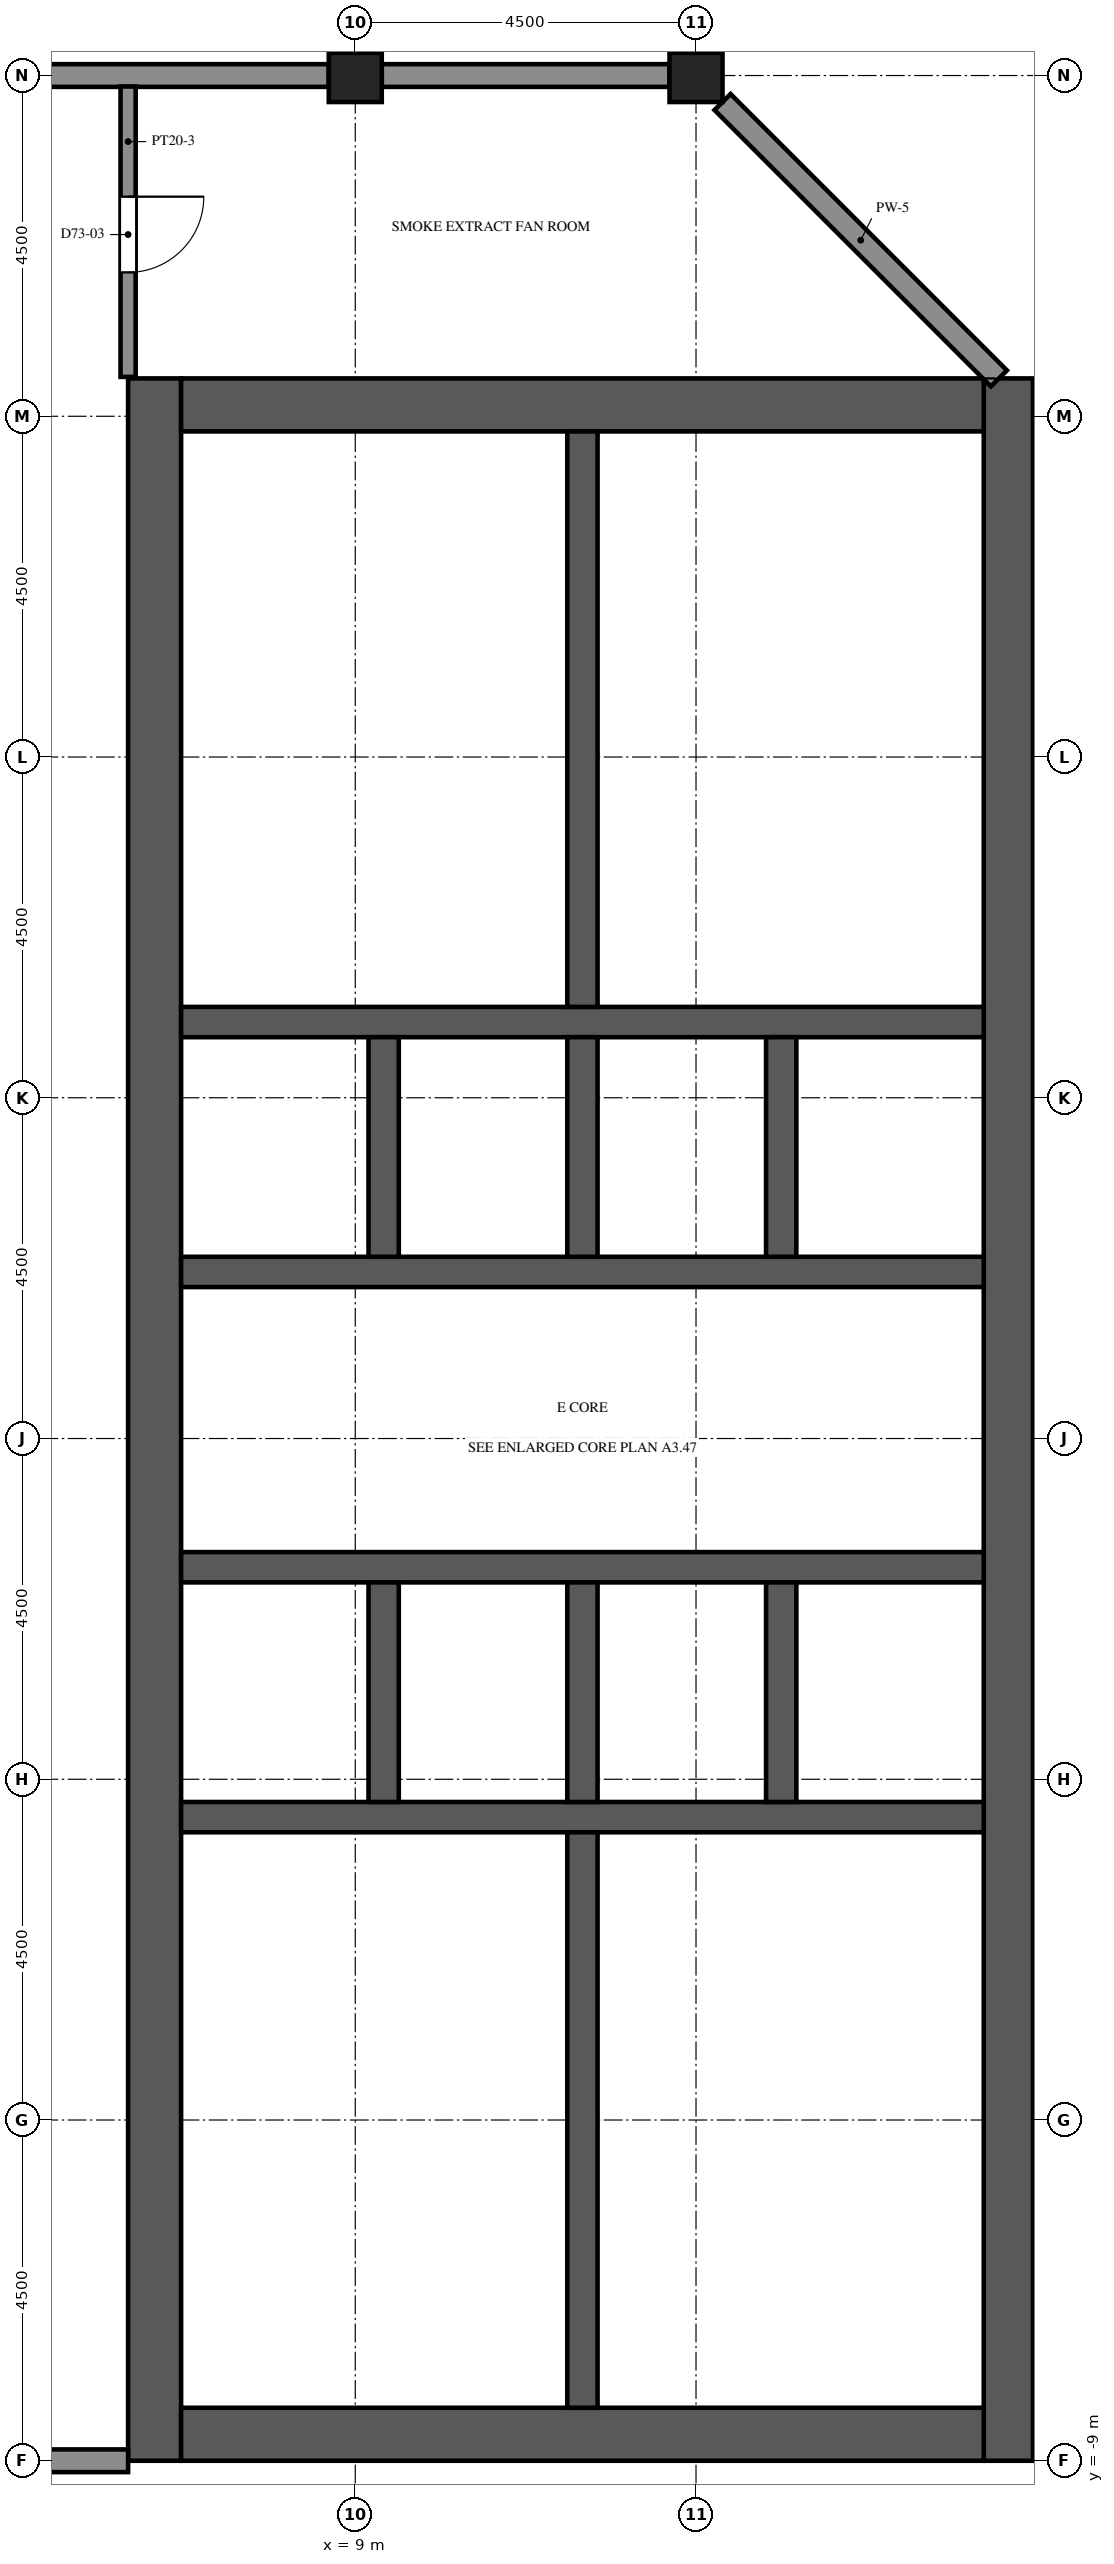
"""IFC4 building model, lengths in metres.
Left out: names, types, materials, properties, quantities, classifications, styles, units other than length and angle.
Written with IfcOpenShell. Run it as: python <this file> out.ifc"""

import sys

from ifc_helpers import new_model, si_unit, direction, frame, frame_2d, origin, origin_2d, place, context, subcontext, project, spatial, rectangle, extrude, element, fill, save


model = new_model("IFC4")
c1 = context("Model", 3, precision=1e-05, world=origin(), true_north=direction((0.0, 1.0)))
c2 = subcontext(c1, "Body", "Model", "MODEL_VIEW")
j1 = project(units=[si_unit("LENGTHUNIT", "METRE"), si_unit("PLANEANGLEUNIT", "RADIAN")], contexts=[c1])
p1 = place(None, origin())
s1 = spatial("IfcSite", under=j1, at=p1, CompositionType="ELEMENT")
p2 = place(p1, origin())
s2 = spatial("IfcBuilding", under=s1, at=p2, CompositionType="ELEMENT")
p3 = place(p2, frame((0.0, 0.0, 326.2)))
s3 = spatial("IfcBuildingStorey", under=s2, at=p3, CompositionType="ELEMENT", Elevation=326.2)
for number, where, z_axis, x_axis in (
    (1, (9.0, 22.5, 0.0), (0.0, 0.0, 1.0), (1.0, 0.0, 0.0)),
    (2, (13.5, 22.5, 0.0), (0.0, 0.0, 1.0), (1.0, 0.0, 0.0)),
):
    element("IfcColumn", number, at=place(p3, frame(where, z_axis=z_axis, x_axis=x_axis)), inside=s3, PredefinedType="COLUMN", context=c2, shape_type="SweptSolid", body=[
        extrude(rectangle(XDim=0.7, YDim=0.7, at=origin_2d()), origin(), (0.0, 0.0, 1.0), 3.6),
    ])
p4 = place(p3, frame((6.35, -9.0, 0.0), z_axis=(0.0, 0.0, 1.0), x_axis=(0.0, 1.0, 0.0)))
e3 = element("IfcWall", 3, at=p4, inside=s3, PredefinedType="SHEAR", context=c2, shape_type="SweptSolid", body=[
    extrude(rectangle(XDim=27.5, YDim=0.7, at=frame_2d((13.75, 0.0))), origin(), (0.0, 0.0, 1.0), 3.2),
])
p5 = place(p4, frame((12.55, 0.0, 0.0)))
e4 = element("IfcOpeningElement", 4, at=p5, cuts=e3, PredefinedType="OPENING", context=c2, shape_type="SweptSolid", body=[
    extrude(rectangle(XDim=2.4, YDim=2.4, at=frame_2d((1.2, 1.2))), frame((0.0, 0.36, 0.0), z_axis=(0.0, -1.0, 0.0), x_axis=(1.0, 0.0, 0.0)), (0.0, 0.0, 1.0), 0.72),
])
p6 = place(p4, frame((3.9, 0.0, 0.0)))
e5 = element("IfcOpeningElement", 5, at=p6, cuts=e3, PredefinedType="OPENING", context=c2, shape_type="SweptSolid", body=[
    extrude(rectangle(XDim=1.2, YDim=2.1, at=frame_2d((0.6, 1.05))), frame((0.0, 0.36, 0.0), z_axis=(0.0, -1.0, 0.0), x_axis=(1.0, 0.0, 0.0)), (0.0, 0.0, 1.0), 0.72),
])
p7 = place(p4, frame((22.4, 0.0, 0.0)))
e6 = element("IfcOpeningElement", 6, at=p7, cuts=e3, PredefinedType="OPENING", context=c2, shape_type="SweptSolid", body=[
    extrude(rectangle(XDim=1.2, YDim=2.1, at=frame_2d((0.6, 1.05))), frame((0.0, 0.36, 0.0), z_axis=(0.0, -1.0, 0.0), x_axis=(1.0, 0.0, 0.0)), (0.0, 0.0, 1.0), 0.72),
])
p8 = place(p3, frame((17.65, -9.0, 0.0), z_axis=(0.0, 0.0, 1.0), x_axis=(0.0, 1.0, 0.0)))
e7 = element("IfcWall", 7, at=p8, inside=s3, PredefinedType="SHEAR", context=c2, shape_type="SweptSolid", body=[
    extrude(rectangle(XDim=27.5, YDim=0.7, at=frame_2d((13.75, 0.0))), origin(), (0.0, 0.0, 1.0), 3.2),
])
for number, where, z_axis, x_axis in (
    (8, (6.7, -8.65, 0.0), (0.0, 0.0, 1.0), (1.0, 0.0, 0.0)),
    (9, (6.7, 18.15, 0.0), (0.0, 0.0, 1.0), (1.0, 0.0, 0.0)),
):
    element("IfcWall", number, at=place(p3, frame(where, z_axis=z_axis, x_axis=x_axis)), inside=s3, PredefinedType="SHEAR", context=c2, shape_type="SweptSolid", body=[
        extrude(rectangle(XDim=10.6, YDim=0.7, at=frame_2d((5.3, 0.0))), origin(), (0.0, 0.0, 1.0), 3.2),
    ])
p9 = place(p3, frame((6.7, -0.5, 0.0), z_axis=(0.0, 0.0, 1.0), x_axis=(1.0, 0.0, 0.0)))
e10 = element("IfcWall", 10, at=p9, inside=s3, PredefinedType="SHEAR", context=c2, shape_type="SweptSolid", body=[
    extrude(rectangle(XDim=10.6, YDim=0.4, at=frame_2d((5.3, 0.0))), origin(), (0.0, 0.0, 1.0), 3.2),
])
p10 = place(p3, frame((6.7, 2.8, 0.0), z_axis=(0.0, 0.0, 1.0), x_axis=(1.0, 0.0, 0.0)))
e11 = element("IfcWall", 11, at=p10, inside=s3, PredefinedType="SHEAR", context=c2, shape_type="SweptSolid", body=[
    extrude(rectangle(XDim=10.6, YDim=0.4, at=frame_2d((5.3, 0.0))), origin(), (0.0, 0.0, 1.0), 3.2),
])
p11 = place(p10, frame((0.688, 0.0, 0.0)))
e12 = element("IfcOpeningElement", 12, at=p11, cuts=e11, PredefinedType="OPENING", context=c2, shape_type="SweptSolid", body=[
    extrude(rectangle(XDim=1.1, YDim=2.1, at=frame_2d((0.55, 1.05))), frame((0.0, 0.21, 0.0), z_axis=(0.0, -1.0, 0.0), x_axis=(1.0, 0.0, 0.0)), (0.0, 0.0, 1.0), 0.42),
])
p12 = place(p10, frame((3.488, 0.0, 0.0)))
e13 = element("IfcOpeningElement", 13, at=p12, cuts=e11, PredefinedType="OPENING", context=c2, shape_type="SweptSolid", body=[
    extrude(rectangle(XDim=1.0, YDim=2.1, at=frame_2d((0.5, 1.05))), frame((0.0, 0.21, 0.0), z_axis=(0.0, -1.0, 0.0), x_axis=(1.0, 0.0, 0.0)), (0.0, 0.0, 1.0), 0.42),
])
p13 = place(p10, frame((6.113, 0.0, 0.0)))
e14 = element("IfcOpeningElement", 14, at=p13, cuts=e11, PredefinedType="OPENING", context=c2, shape_type="SweptSolid", body=[
    extrude(rectangle(XDim=1.0, YDim=2.1, at=frame_2d((0.5, 1.05))), frame((0.0, 0.21, 0.0), z_axis=(0.0, -1.0, 0.0), x_axis=(1.0, 0.0, 0.0)), (0.0, 0.0, 1.0), 0.42),
])
p14 = place(p10, frame((8.863, 0.0, 0.0)))
e15 = element("IfcOpeningElement", 15, at=p14, cuts=e11, PredefinedType="OPENING", context=c2, shape_type="SweptSolid", body=[
    extrude(rectangle(XDim=1.0, YDim=2.1, at=frame_2d((0.5, 1.05))), frame((0.0, 0.21, 0.0), z_axis=(0.0, -1.0, 0.0), x_axis=(1.0, 0.0, 0.0)), (0.0, 0.0, 1.0), 0.42),
])
p15 = place(p3, frame((6.7, 6.7, 0.0), z_axis=(0.0, 0.0, 1.0), x_axis=(1.0, 0.0, 0.0)))
e16 = element("IfcWall", 16, at=p15, inside=s3, PredefinedType="SHEAR", context=c2, shape_type="SweptSolid", body=[
    extrude(rectangle(XDim=10.6, YDim=0.4, at=frame_2d((5.3, 0.0))), origin(), (0.0, 0.0, 1.0), 3.2),
])
p16 = place(p15, frame((0.738, 0.0, 0.0)))
e17 = element("IfcOpeningElement", 17, at=p16, cuts=e16, PredefinedType="OPENING", context=c2, shape_type="SweptSolid", body=[
    extrude(rectangle(XDim=1.0, YDim=2.1, at=frame_2d((0.5, 1.05))), frame((0.0, 0.21, 0.0), z_axis=(0.0, -1.0, 0.0), x_axis=(1.0, 0.0, 0.0)), (0.0, 0.0, 1.0), 0.42),
])
p17 = place(p15, frame((3.488, 0.0, 0.0)))
e18 = element("IfcOpeningElement", 18, at=p17, cuts=e16, PredefinedType="OPENING", context=c2, shape_type="SweptSolid", body=[
    extrude(rectangle(XDim=1.0, YDim=2.1, at=frame_2d((0.5, 1.05))), frame((0.0, 0.21, 0.0), z_axis=(0.0, -1.0, 0.0), x_axis=(1.0, 0.0, 0.0)), (0.0, 0.0, 1.0), 0.42),
])
p18 = place(p15, frame((6.113, 0.0, 0.0)))
e19 = element("IfcOpeningElement", 19, at=p18, cuts=e16, PredefinedType="OPENING", context=c2, shape_type="SweptSolid", body=[
    extrude(rectangle(XDim=1.0, YDim=2.1, at=frame_2d((0.5, 1.05))), frame((0.0, 0.21, 0.0), z_axis=(0.0, -1.0, 0.0), x_axis=(1.0, 0.0, 0.0)), (0.0, 0.0, 1.0), 0.42),
])
p19 = place(p15, frame((8.863, 0.0, 0.0)))
e20 = element("IfcOpeningElement", 20, at=p19, cuts=e16, PredefinedType="OPENING", context=c2, shape_type="SweptSolid", body=[
    extrude(rectangle(XDim=1.0, YDim=2.1, at=frame_2d((0.5, 1.05))), frame((0.0, 0.21, 0.0), z_axis=(0.0, -1.0, 0.0), x_axis=(1.0, 0.0, 0.0)), (0.0, 0.0, 1.0), 0.42),
])
p20 = place(p3, frame((6.7, 10.0, 0.0), z_axis=(0.0, 0.0, 1.0), x_axis=(1.0, 0.0, 0.0)))
e21 = element("IfcWall", 21, at=p20, inside=s3, PredefinedType="SHEAR", context=c2, shape_type="SweptSolid", body=[
    extrude(rectangle(XDim=10.6, YDim=0.4, at=frame_2d((5.3, 0.0))), origin(), (0.0, 0.0, 1.0), 3.2),
])
for number, where, z_axis, x_axis in (
    (22, (9.375, -0.3, 0.0), (0.0, 0.0, 1.0), (0.0, 1.0, 0.0)),
    (23, (9.375, 6.9, 0.0), (0.0, 0.0, 1.0), (0.0, 1.0, 0.0)),
    (24, (12.0, -0.3, 0.0), (0.0, 0.0, 1.0), (0.0, 1.0, 0.0)),
    (25, (12.0, 6.9, 0.0), (0.0, 0.0, 1.0), (0.0, 1.0, 0.0)),
    (26, (14.625, -0.3, 0.0), (0.0, 0.0, 1.0), (0.0, 1.0, 0.0)),
    (27, (14.625, 6.9, 0.0), (0.0, 0.0, 1.0), (0.0, 1.0, 0.0)),
):
    element("IfcWall", number, at=place(p3, frame(where, z_axis=z_axis, x_axis=x_axis)), inside=s3, PredefinedType="SHEAR", context=c2, shape_type="SweptSolid", body=[
        extrude(rectangle(XDim=2.9, YDim=0.4, at=frame_2d((1.45, 0.0))), origin(), (0.0, 0.0, 1.0), 3.2),
    ])
p21 = place(p3, frame((12.0, -8.3, 0.0), z_axis=(0.0, 0.0, 1.0), x_axis=(0.0, 1.0, 0.0)))
e28 = element("IfcWall", 28, at=p21, inside=s3, PredefinedType="SHEAR", context=c2, shape_type="SweptSolid", body=[
    extrude(rectangle(XDim=7.6, YDim=0.4, at=frame_2d((3.8, 0.0))), origin(), (0.0, 0.0, 1.0), 3.2),
])
p22 = place(p21, frame((6.125, 0.0, 0.0)))
e29 = element("IfcOpeningElement", 29, at=p22, cuts=e28, PredefinedType="OPENING", context=c2, shape_type="SweptSolid", body=[
    extrude(rectangle(XDim=1.2, YDim=2.1, at=frame_2d((0.6, 1.05))), frame((0.0, 0.21, 0.0), z_axis=(0.0, -1.0, 0.0), x_axis=(1.0, 0.0, 0.0)), (0.0, 0.0, 1.0), 0.42),
])
p23 = place(p3, frame((12.0, 10.2, 0.0), z_axis=(0.0, 0.0, 1.0), x_axis=(0.0, 1.0, 0.0)))
e30 = element("IfcWall", 30, at=p23, inside=s3, PredefinedType="SHEAR", context=c2, shape_type="SweptSolid", body=[
    extrude(rectangle(XDim=7.6, YDim=0.4, at=frame_2d((3.8, 0.0))), origin(), (0.0, 0.0, 1.0), 3.2),
])
p24 = place(p23, frame((0.275, 0.0, 0.0)))
e31 = element("IfcOpeningElement", 31, at=p24, cuts=e30, PredefinedType="OPENING", context=c2, shape_type="SweptSolid", body=[
    extrude(rectangle(XDim=1.2, YDim=2.1, at=frame_2d((0.6, 1.05))), frame((0.0, 0.21, 0.0), z_axis=(0.0, -1.0, 0.0), x_axis=(1.0, 0.0, 0.0)), (0.0, 0.0, 1.0), 0.42),
])
p25 = place(p3, frame((4.85, -9.0, 0.0), z_axis=(0.0, 0.0, 1.0), x_axis=(1.0, 0.0, 0.0)))
e32 = element("IfcWall", 32, at=p25, inside=s3, PredefinedType="SOLIDWALL", context=c2, shape_type="SweptSolid", body=[
    extrude(rectangle(XDim=1.15, YDim=0.3, at=frame_2d((0.575, 0.0))), origin(), (0.0, 0.0, 1.0), 0.85),
])
p26 = place(p3, frame((17.5, 18.5, 0.0), z_axis=(0.0, 0.0, 1.0), x_axis=(-0.707106781187, 0.707106781187, 0.0)))
e33 = element("IfcWall", 33, at=p26, inside=s3, PredefinedType="SOLIDWALL", context=c2, shape_type="SweptSolid", body=[
    extrude(rectangle(XDim=5.162, YDim=0.3, at=frame_2d((2.581, 0.0))), origin(), (0.0, 0.0, 1.0), 2.5),
])
for number, where, z_axis, x_axis in (
    (34, (13.15, 22.5, 0.0), (0.0, 0.0, 1.0), (-1.0, 0.0, 0.0)),
    (35, (8.65, 22.5, 0.0), (0.0, 0.0, 1.0), (-1.0, 0.0, 0.0)),
):
    element("IfcWall", number, at=place(p3, frame(where, z_axis=z_axis, x_axis=x_axis)), inside=s3, PredefinedType="SOLIDWALL", context=c2, shape_type="SweptSolid", body=[
        extrude(rectangle(XDim=3.8, YDim=0.3, at=frame_2d((1.9, 0.0))), origin(), (0.0, 0.0, 1.0), 0.85),
    ])
p27 = place(p3, frame((6.0, 22.355, 0.0), z_axis=(0.0, 0.0, 1.0), x_axis=(0.0, -1.0, 0.0)))
e36 = element("IfcWall", 36, at=p27, inside=s3, PredefinedType="PARTITIONING", context=c2, shape_type="SweptSolid", body=[
    extrude(rectangle(XDim=3.835, YDim=0.2, at=frame_2d((1.917, 0.0))), origin(), (0.0, 0.0, 1.0), 3.2),
])
p28 = place(p27, frame((1.455, 0.0, 0.0)))
e37 = element("IfcOpeningElement", 37, at=p28, cuts=e36, PredefinedType="OPENING", context=c2, shape_type="SweptSolid", body=[
    extrude(rectangle(XDim=1.0, YDim=2.1, at=frame_2d((0.5, 1.05))), frame((0.0, 0.11, 0.0), z_axis=(0.0, -1.0, 0.0), x_axis=(1.0, 0.0, 0.0)), (0.0, 0.0, 1.0), 0.22),
])
p29 = place(p28, origin())
e38 = element("IfcDoor", 38, at=p29, inside=s3, OperationType="SINGLE_SWING_LEFT", PredefinedType="DOOR", context=c2, shape_type="SweptSolid", body=[
    extrude(rectangle(XDim=1.0, YDim=2.1, at=frame_2d((0.5, 1.05))), frame((0.0, 0.025, 0.0), z_axis=(0.0, -1.0, 0.0), x_axis=(1.0, 0.0, 0.0)), (0.0, 0.0, 1.0), 0.05),
])
fill(e37, e38)
p30 = place(p11, origin())
e39 = element("IfcDoor", 39, at=p30, inside=s3, OperationType="DOUBLE_DOOR_SLIDING", PredefinedType="DOOR", context=c2, shape_type="SweptSolid", body=[
    extrude(rectangle(XDim=1.1, YDim=2.1, at=frame_2d((0.55, 1.05))), frame((0.0, 0.025, 0.0), z_axis=(0.0, -1.0, 0.0), x_axis=(1.0, 0.0, 0.0)), (0.0, 0.0, 1.0), 0.05),
])
fill(e12, e39)
p31 = place(p5, origin())
e40 = element("IfcDoor", 40, at=p31, inside=s3, OperationType="DOUBLE_DOOR_DOUBLE_SWING", PredefinedType="DOOR", context=c2, shape_type="SweptSolid", body=[
    extrude(rectangle(XDim=2.4, YDim=2.4, at=frame_2d((1.2, 1.2))), frame((0.0, 0.025, 0.0), z_axis=(0.0, -1.0, 0.0), x_axis=(1.0, 0.0, 0.0)), (0.0, 0.0, 1.0), 0.05),
])
fill(e4, e40)
p32 = place(p22, origin())
e41 = element("IfcDoor", 41, at=p32, inside=s3, OperationType="SINGLE_SWING_RIGHT", PredefinedType="DOOR", context=c2, shape_type="SweptSolid", body=[
    extrude(rectangle(XDim=1.2, YDim=2.1, at=frame_2d((0.6, 1.05))), frame((0.0, 0.025, 0.0), z_axis=(0.0, -1.0, 0.0), x_axis=(1.0, 0.0, 0.0)), (0.0, 0.0, 1.0), 0.05),
])
fill(e29, e41)
p33 = place(p24, origin())
e42 = element("IfcDoor", 42, at=p33, inside=s3, OperationType="SINGLE_SWING_RIGHT", PredefinedType="DOOR", context=c2, shape_type="SweptSolid", body=[
    extrude(rectangle(XDim=1.2, YDim=2.1, at=frame_2d((0.6, 1.05))), frame((0.0, 0.025, 0.0), z_axis=(0.0, -1.0, 0.0), x_axis=(1.0, 0.0, 0.0)), (0.0, 0.0, 1.0), 0.05),
])
fill(e31, e42)
p34 = place(p12, origin())
e43 = element("IfcDoor", 43, at=p34, inside=s3, OperationType="SINGLE_SWING_RIGHT", PredefinedType="DOOR", context=c2, shape_type="SweptSolid", body=[
    extrude(rectangle(XDim=1.0, YDim=2.1, at=frame_2d((0.5, 1.05))), frame((0.0, 0.025, 0.0), z_axis=(0.0, -1.0, 0.0), x_axis=(1.0, 0.0, 0.0)), (0.0, 0.0, 1.0), 0.05),
])
fill(e13, e43)
p35 = place(p13, origin())
e44 = element("IfcDoor", 44, at=p35, inside=s3, OperationType="SINGLE_SWING_LEFT", PredefinedType="DOOR", context=c2, shape_type="SweptSolid", body=[
    extrude(rectangle(XDim=1.0, YDim=2.1, at=frame_2d((0.5, 1.05))), frame((0.0, 0.025, 0.0), z_axis=(0.0, -1.0, 0.0), x_axis=(1.0, 0.0, 0.0)), (0.0, 0.0, 1.0), 0.05),
])
fill(e14, e44)
p36 = place(p14, origin())
e45 = element("IfcDoor", 45, at=p36, inside=s3, OperationType="SINGLE_SWING_RIGHT", PredefinedType="DOOR", context=c2, shape_type="SweptSolid", body=[
    extrude(rectangle(XDim=1.0, YDim=2.1, at=frame_2d((0.5, 1.05))), frame((0.0, 0.025, 0.0), z_axis=(0.0, -1.0, 0.0), x_axis=(1.0, 0.0, 0.0)), (0.0, 0.0, 1.0), 0.05),
])
fill(e15, e45)
p37 = place(p16, origin())
e46 = element("IfcDoor", 46, at=p37, inside=s3, OperationType="SINGLE_SWING_LEFT", PredefinedType="DOOR", context=c2, shape_type="SweptSolid", body=[
    extrude(rectangle(XDim=1.0, YDim=2.1, at=frame_2d((0.5, 1.05))), frame((0.0, 0.025, 0.0), z_axis=(0.0, -1.0, 0.0), x_axis=(1.0, 0.0, 0.0)), (0.0, 0.0, 1.0), 0.05),
])
fill(e17, e46)
p38 = place(p17, origin())
e47 = element("IfcDoor", 47, at=p38, inside=s3, OperationType="SINGLE_SWING_RIGHT", PredefinedType="DOOR", context=c2, shape_type="SweptSolid", body=[
    extrude(rectangle(XDim=1.0, YDim=2.1, at=frame_2d((0.5, 1.05))), frame((0.0, 0.025, 0.0), z_axis=(0.0, -1.0, 0.0), x_axis=(1.0, 0.0, 0.0)), (0.0, 0.0, 1.0), 0.05),
])
fill(e18, e47)
p39 = place(p18, origin())
e48 = element("IfcDoor", 48, at=p39, inside=s3, OperationType="SINGLE_SWING_LEFT", PredefinedType="DOOR", context=c2, shape_type="SweptSolid", body=[
    extrude(rectangle(XDim=1.0, YDim=2.1, at=frame_2d((0.5, 1.05))), frame((0.0, 0.025, 0.0), z_axis=(0.0, -1.0, 0.0), x_axis=(1.0, 0.0, 0.0)), (0.0, 0.0, 1.0), 0.05),
])
fill(e19, e48)
p40 = place(p19, origin())
e49 = element("IfcDoor", 49, at=p40, inside=s3, OperationType="SINGLE_SWING_RIGHT", PredefinedType="DOOR", context=c2, shape_type="SweptSolid", body=[
    extrude(rectangle(XDim=1.0, YDim=2.1, at=frame_2d((0.5, 1.05))), frame((0.0, 0.025, 0.0), z_axis=(0.0, -1.0, 0.0), x_axis=(1.0, 0.0, 0.0)), (0.0, 0.0, 1.0), 0.05),
])
fill(e20, e49)
p41 = place(p6, origin())
e50 = element("IfcDoor", 50, at=p41, inside=s3, OperationType="SINGLE_SWING_RIGHT", PredefinedType="DOOR", context=c2, shape_type="SweptSolid", body=[
    extrude(rectangle(XDim=1.2, YDim=2.1, at=frame_2d((0.6, 1.05))), frame((0.0, -0.275, 0.0), z_axis=(0.0, -1.0, 0.0), x_axis=(1.0, 0.0, 0.0)), (0.0, 0.0, 1.0), 0.05),
])
fill(e5, e50)
p42 = place(p7, origin())
e51 = element("IfcDoor", 51, at=p42, inside=s3, OperationType="SINGLE_SWING_RIGHT", PredefinedType="DOOR", context=c2, shape_type="SweptSolid", body=[
    extrude(rectangle(XDim=1.2, YDim=2.1, at=frame_2d((0.6, 1.05))), frame((0.0, -0.275, 0.0), z_axis=(0.0, -1.0, 0.0), x_axis=(1.0, 0.0, 0.0)), (0.0, 0.0, 1.0), 0.05),
])
fill(e6, e51)
save(model, sys.argv[1])
